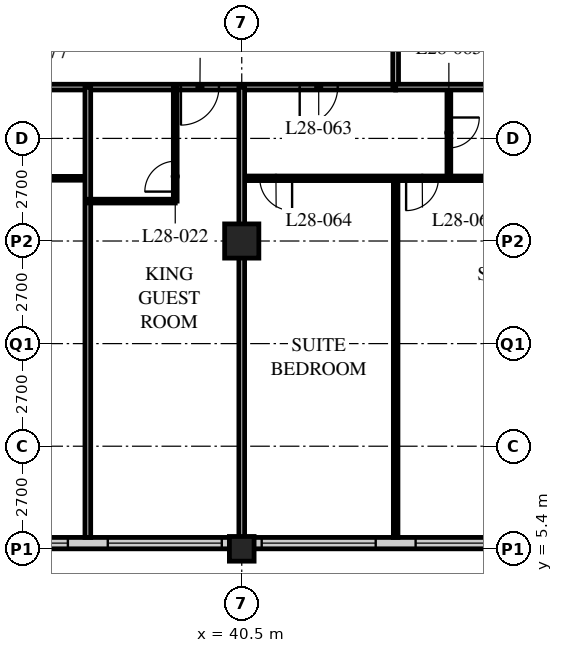
"""IFC4 building model, lengths in metres.
Left out: names, types, materials, properties, quantities, classifications, styles, units other than length and angle.
Written with IfcOpenShell. Run it as: python <this file> out.ifc"""

import sys

from ifc_helpers import new_model, si_unit, direction, frame, frame_2d, origin, origin_2d, place, context, subcontext, project, spatial, rectangle, hollow_rectangle, extrude, element, fill, save


model = new_model("IFC4")
c1 = context("Model", 3, precision=1e-05, world=origin(), true_north=direction((0.0, 1.0)))
c2 = subcontext(c1, "Body", "Model", "MODEL_VIEW")
j1 = project(units=[si_unit("LENGTHUNIT", "METRE"), si_unit("PLANEANGLEUNIT", "RADIAN")], contexts=[c1])
p1 = place(None, origin())
s1 = spatial("IfcSite", under=j1, at=p1, CompositionType="ELEMENT")
p2 = place(p1, origin())
s2 = spatial("IfcBuilding", under=s1, at=p2, CompositionType="ELEMENT")
p3 = place(p2, frame((0.0, 0.0, 113.6)))
s3 = spatial("IfcBuildingStorey", under=s2, at=p3, CompositionType="ELEMENT", Elevation=113.6)
p4 = place(p3, frame((40.5, 5.4, 0.0), z_axis=(0.0, 0.0, 1.0), x_axis=(1.0, 0.0, 0.0)))
e1 = element("IfcColumn", 1, at=p4, inside=s3, PredefinedType="COLUMN", context=c2, shape_type="SweptSolid", body=[
    extrude(hollow_rectangle(XDim=0.65, YDim=0.65, WallThickness=0.055, at=origin_2d()), origin(), (0.0, 0.0, 1.0), 3.4),
])
p5 = place(p3, frame((40.5, 13.5, 0.0), z_axis=(0.0, 0.0, 1.0), x_axis=(1.0, 0.0, 0.0)))
e2 = element("IfcColumn", 2, at=p5, inside=s3, PredefinedType="COLUMN", context=c2, shape_type="SweptSolid", body=[
    extrude(hollow_rectangle(XDim=0.9, YDim=0.9, WallThickness=0.09, at=origin_2d()), origin(), (0.0, 0.0, 1.0), 3.4),
])
p6 = place(p3, frame((8.4, 5.55, 0.0), z_axis=(0.0, 0.0, 1.0), x_axis=(1.0, 0.0, 0.0)))
e3 = element("IfcWall", 3, at=p6, inside=s3, PredefinedType="SOLIDWALL", context=c2, shape_type="SweptSolid", body=[
    extrude(rectangle(XDim=40.2, YDim=0.3, at=frame_2d((20.1, 0.0))), origin(), (0.0, 0.0, 1.0), 3.19),
])
p7 = place(p6, frame((0.225, 0.0, 0.9)))
e4 = element("IfcOpeningElement", 4, at=p7, cuts=e3, PredefinedType="OPENING", context=c2, shape_type="SweptSolid", body=[
    extrude(rectangle(XDim=3.0, YDim=2.0, at=frame_2d((1.5, 1.0))), frame((0.0, 0.16, 0.0), z_axis=(0.0, -1.0, 0.0), x_axis=(1.0, 0.0, 0.0)), (0.0, 0.0, 1.0), 0.32),
])
p8 = place(p6, frame((4.275, 0.0, 0.9)))
e5 = element("IfcOpeningElement", 5, at=p8, cuts=e3, PredefinedType="OPENING", context=c2, shape_type="SweptSolid", body=[
    extrude(rectangle(XDim=3.0, YDim=2.0, at=frame_2d((1.5, 1.0))), frame((0.0, 0.16, 0.0), z_axis=(0.0, -1.0, 0.0), x_axis=(1.0, 0.0, 0.0)), (0.0, 0.0, 1.0), 0.32),
])
p9 = place(p6, frame((8.325, 0.0, 0.9)))
e6 = element("IfcOpeningElement", 6, at=p9, cuts=e3, PredefinedType="OPENING", context=c2, shape_type="SweptSolid", body=[
    extrude(rectangle(XDim=3.0, YDim=2.0, at=frame_2d((1.5, 1.0))), frame((0.0, 0.16, 0.0), z_axis=(0.0, -1.0, 0.0), x_axis=(1.0, 0.0, 0.0)), (0.0, 0.0, 1.0), 0.32),
])
p10 = place(p6, frame((12.375, 0.0, 0.9)))
e7 = element("IfcOpeningElement", 7, at=p10, cuts=e3, PredefinedType="OPENING", context=c2, shape_type="SweptSolid", body=[
    extrude(rectangle(XDim=3.0, YDim=2.0, at=frame_2d((1.5, 1.0))), frame((0.0, 0.16, 0.0), z_axis=(0.0, -1.0, 0.0), x_axis=(1.0, 0.0, 0.0)), (0.0, 0.0, 1.0), 0.32),
])
p11 = place(p6, frame((16.425, 0.0, 0.9)))
e8 = element("IfcOpeningElement", 8, at=p11, cuts=e3, PredefinedType="OPENING", context=c2, shape_type="SweptSolid", body=[
    extrude(rectangle(XDim=3.0, YDim=2.0, at=frame_2d((1.5, 1.0))), frame((0.0, 0.16, 0.0), z_axis=(0.0, -1.0, 0.0), x_axis=(1.0, 0.0, 0.0)), (0.0, 0.0, 1.0), 0.32),
])
p12 = place(p6, frame((20.475, 0.0, 0.9)))
e9 = element("IfcOpeningElement", 9, at=p12, cuts=e3, PredefinedType="OPENING", context=c2, shape_type="SweptSolid", body=[
    extrude(rectangle(XDim=3.0, YDim=2.0, at=frame_2d((1.5, 1.0))), frame((0.0, 0.16, 0.0), z_axis=(0.0, -1.0, 0.0), x_axis=(1.0, 0.0, 0.0)), (0.0, 0.0, 1.0), 0.32),
])
p13 = place(p6, frame((24.525, 0.0, 0.9)))
e10 = element("IfcOpeningElement", 10, at=p13, cuts=e3, PredefinedType="OPENING", context=c2, shape_type="SweptSolid", body=[
    extrude(rectangle(XDim=3.0, YDim=2.0, at=frame_2d((1.5, 1.0))), frame((0.0, 0.16, 0.0), z_axis=(0.0, -1.0, 0.0), x_axis=(1.0, 0.0, 0.0)), (0.0, 0.0, 1.0), 0.32),
])
p14 = place(p6, frame((28.575, 0.0, 0.9)))
e11 = element("IfcOpeningElement", 11, at=p14, cuts=e3, PredefinedType="OPENING", context=c2, shape_type="SweptSolid", body=[
    extrude(rectangle(XDim=3.0, YDim=2.0, at=frame_2d((1.5, 1.0))), frame((0.0, 0.16, 0.0), z_axis=(0.0, -1.0, 0.0), x_axis=(1.0, 0.0, 0.0)), (0.0, 0.0, 1.0), 0.32),
])
p15 = place(p6, frame((32.625, 0.0, 0.9)))
e12 = element("IfcOpeningElement", 12, at=p15, cuts=e3, PredefinedType="OPENING", context=c2, shape_type="SweptSolid", body=[
    extrude(rectangle(XDim=3.0, YDim=2.0, at=frame_2d((1.5, 1.0))), frame((0.0, 0.16, 0.0), z_axis=(0.0, -1.0, 0.0), x_axis=(1.0, 0.0, 0.0)), (0.0, 0.0, 1.0), 0.32),
])
p16 = place(p6, frame((36.675, 0.0, 0.9)))
e13 = element("IfcOpeningElement", 13, at=p16, cuts=e3, PredefinedType="OPENING", context=c2, shape_type="SweptSolid", body=[
    extrude(rectangle(XDim=3.0, YDim=2.0, at=frame_2d((1.5, 1.0))), frame((0.0, 0.16, 0.0), z_axis=(0.0, -1.0, 0.0), x_axis=(1.0, 0.0, 0.0)), (0.0, 0.0, 1.0), 0.32),
])
p17 = place(p3, frame((12.15, 17.55, 0.0), z_axis=(0.0, 0.0, 1.0), x_axis=(1.0, 0.0, 0.0)))
e14 = element("IfcWall", 14, at=p17, inside=s3, PredefinedType="PARTITIONING", context=c2, shape_type="SweptSolid", body=[
    extrude(rectangle(XDim=32.4, YDim=0.15, at=frame_2d((16.2, 0.0))), origin(), (0.0, 0.0, 1.0), 3.19),
])
p18 = place(p17, frame((5.95, 0.0, 0.0)))
e15 = element("IfcOpeningElement", 15, at=p18, cuts=e14, PredefinedType="OPENING", context=c2, shape_type="SweptSolid", body=[
    extrude(rectangle(XDim=1.0, YDim=2.1, at=frame_2d((0.5, 1.05))), frame((0.0, 0.085, 0.0), z_axis=(0.0, -1.0, 0.0), x_axis=(1.0, 0.0, 0.0)), (0.0, 0.0, 1.0), 0.17),
])
p19 = place(p17, frame((17.725, 0.0, 0.0)))
e16 = element("IfcOpeningElement", 16, at=p19, cuts=e14, PredefinedType="OPENING", context=c2, shape_type="SweptSolid", body=[
    extrude(rectangle(XDim=1.0, YDim=2.1, at=frame_2d((0.5, 1.05))), frame((0.0, 0.085, 0.0), z_axis=(0.0, -1.0, 0.0), x_axis=(1.0, 0.0, 0.0)), (0.0, 0.0, 1.0), 0.17),
])
p20 = place(p17, frame((26.75, 0.0, 0.0)))
e17 = element("IfcOpeningElement", 17, at=p20, cuts=e14, PredefinedType="OPENING", context=c2, shape_type="SweptSolid", body=[
    extrude(rectangle(XDim=1.0, YDim=2.1, at=frame_2d((0.5, 1.05))), frame((0.0, 0.085, 0.0), z_axis=(0.0, -1.0, 0.0), x_axis=(1.0, 0.0, 0.0)), (0.0, 0.0, 1.0), 0.17),
])
p21 = place(p17, frame((1.525, 0.0, 0.0)))
e18 = element("IfcOpeningElement", 18, at=p21, cuts=e14, PredefinedType="OPENING", context=c2, shape_type="SweptSolid", body=[
    extrude(rectangle(XDim=1.0, YDim=2.1, at=frame_2d((0.5, 1.05))), frame((0.0, 0.085, 0.0), z_axis=(0.0, -1.0, 0.0), x_axis=(1.0, 0.0, 0.0)), (0.0, 0.0, 1.0), 0.17),
])
p22 = place(p17, frame((29.875, 0.0, 0.0)))
e19 = element("IfcOpeningElement", 19, at=p22, cuts=e14, PredefinedType="OPENING", context=c2, shape_type="SweptSolid", body=[
    extrude(rectangle(XDim=1.0, YDim=2.1, at=frame_2d((0.5, 1.05))), frame((0.0, 0.085, 0.0), z_axis=(0.0, -1.0, 0.0), x_axis=(1.0, 0.0, 0.0)), (0.0, 0.0, 1.0), 0.17),
])
p23 = place(p3, frame((44.55, 17.55, 0.0), z_axis=(0.0, 0.0, 1.0), x_axis=(0.0, 1.0, 0.0)))
e20 = element("IfcWall", 20, at=p23, inside=s3, PredefinedType="PARTITIONING", context=c2, shape_type="SweptSolid", body=[
    extrude(rectangle(XDim=28.35, YDim=0.15, at=frame_2d((14.175, 0.0))), origin(), (0.0, 0.0, 1.0), 3.19),
])
p24 = place(p23, frame((2.75, 0.0, 0.0)))
e21 = element("IfcOpeningElement", 21, at=p24, cuts=e20, PredefinedType="OPENING", context=c2, shape_type="SweptSolid", body=[
    extrude(rectangle(XDim=1.0, YDim=2.1, at=frame_2d((0.5, 1.05))), frame((0.0, 0.085, 0.0), z_axis=(0.0, -1.0, 0.0), x_axis=(1.0, 0.0, 0.0)), (0.0, 0.0, 1.0), 0.17),
])
p25 = place(p23, frame((6.5, 0.0, 0.0)))
e22 = element("IfcOpeningElement", 22, at=p25, cuts=e20, PredefinedType="OPENING", context=c2, shape_type="SweptSolid", body=[
    extrude(rectangle(XDim=1.0, YDim=2.1, at=frame_2d((0.5, 1.05))), frame((0.0, 0.085, 0.0), z_axis=(0.0, -1.0, 0.0), x_axis=(1.0, 0.0, 0.0)), (0.0, 0.0, 1.0), 0.17),
])
p26 = place(p23, frame((10.0, 0.0, 0.0)))
e23 = element("IfcOpeningElement", 23, at=p26, cuts=e20, PredefinedType="OPENING", context=c2, shape_type="SweptSolid", body=[
    extrude(rectangle(XDim=1.0, YDim=2.1, at=frame_2d((0.5, 1.05))), frame((0.0, 0.085, 0.0), z_axis=(0.0, -1.0, 0.0), x_axis=(1.0, 0.0, 0.0)), (0.0, 0.0, 1.0), 0.17),
])
p27 = place(p23, frame((21.65, 0.0, 0.0)))
e24 = element("IfcOpeningElement", 24, at=p27, cuts=e20, PredefinedType="OPENING", context=c2, shape_type="SweptSolid", body=[
    extrude(rectangle(XDim=1.0, YDim=2.1, at=frame_2d((0.5, 1.05))), frame((0.0, 0.085, 0.0), z_axis=(0.0, -1.0, 0.0), x_axis=(1.0, 0.0, 0.0)), (0.0, 0.0, 1.0), 0.17),
])
p28 = place(p23, frame((26.75, 0.0, 0.0)))
e25 = element("IfcOpeningElement", 25, at=p28, cuts=e20, PredefinedType="OPENING", context=c2, shape_type="SweptSolid", body=[
    extrude(rectangle(XDim=1.0, YDim=2.1, at=frame_2d((0.5, 1.05))), frame((0.0, 0.085, 0.0), z_axis=(0.0, -1.0, 0.0), x_axis=(1.0, 0.0, 0.0)), (0.0, 0.0, 1.0), 0.17),
])
p29 = place(p3, frame((33.85, 15.15, 0.0), z_axis=(0.0, 0.0, 1.0), x_axis=(1.0, 0.0, 0.0)))
e26 = element("IfcWall", 26, at=p29, inside=s3, PredefinedType="PARTITIONING", context=c2, shape_type="SweptSolid", body=[
    extrude(rectangle(XDim=2.6, YDim=0.1, at=frame_2d((1.3, 0.0))), origin(), (0.0, 0.0, 1.0), 3.19),
])
p30 = place(p3, frame((36.45, 17.55, 0.0), z_axis=(0.0, 0.0, 1.0), x_axis=(0.0, -1.0, 0.0)))
e27 = element("IfcWall", 27, at=p30, inside=s3, PredefinedType="PARTITIONING", context=c2, shape_type="SweptSolid", body=[
    extrude(rectangle(XDim=11.85, YDim=0.15, at=frame_2d((5.925, 0.0))), origin(), (0.0, 0.0, 1.0), 3.19),
])
p31 = place(p3, frame((36.45, 14.55, 0.0), z_axis=(0.0, 0.0, 1.0), x_axis=(1.0, 0.0, 0.0)))
e28 = element("IfcWall", 28, at=p31, inside=s3, PredefinedType="PARTITIONING", context=c2, shape_type="SweptSolid", body=[
    extrude(rectangle(XDim=2.3, YDim=0.1, at=frame_2d((1.15, 0.0))), origin(), (0.0, 0.0, 1.0), 3.19),
])
p32 = place(p3, frame((38.75, 17.55, 0.0), z_axis=(0.0, 0.0, 1.0), x_axis=(0.0, -1.0, 0.0)))
e29 = element("IfcWall", 29, at=p32, inside=s3, PredefinedType="PARTITIONING", context=c2, shape_type="SweptSolid", body=[
    extrude(rectangle(XDim=3.0, YDim=0.1, at=frame_2d((1.5, 0.0))), origin(), (0.0, 0.0, 1.0), 3.19),
])
p33 = place(p32, frame((1.95, 0.0, 0.0)))
e30 = element("IfcOpeningElement", 30, at=p33, cuts=e29, PredefinedType="OPENING", context=c2, shape_type="SweptSolid", body=[
    extrude(rectangle(XDim=0.8, YDim=2.1, at=frame_2d((0.4, 1.05))), frame((0.0, 0.06, 0.0), z_axis=(0.0, -1.0, 0.0), x_axis=(1.0, 0.0, 0.0)), (0.0, 0.0, 1.0), 0.12),
])
p34 = place(p3, frame((40.5, 15.15, 0.0), z_axis=(0.0, 0.0, 1.0), x_axis=(1.0, 0.0, 0.0)))
e31 = element("IfcWall", 31, at=p34, inside=s3, PredefinedType="PARTITIONING", context=c2, shape_type="SweptSolid", body=[
    extrude(rectangle(XDim=8.05, YDim=0.12, at=frame_2d((4.025, 0.0))), origin(), (0.0, 0.0, 1.0), 3.19),
])
p35 = place(p34, frame((0.475, 0.0, 0.0)))
e32 = element("IfcOpeningElement", 32, at=p35, cuts=e31, PredefinedType="OPENING", context=c2, shape_type="SweptSolid", body=[
    extrude(rectangle(XDim=0.85, YDim=2.1, at=frame_2d((0.425, 1.05))), frame((0.0, 0.07, 0.0), z_axis=(0.0, -1.0, 0.0), x_axis=(1.0, 0.0, 0.0)), (0.0, 0.0, 1.0), 0.14),
])
p36 = place(p34, frame((4.325, 0.0, 0.0)))
e33 = element("IfcOpeningElement", 33, at=p36, cuts=e31, PredefinedType="OPENING", context=c2, shape_type="SweptSolid", body=[
    extrude(rectangle(XDim=0.85, YDim=2.1, at=frame_2d((0.425, 1.05))), frame((0.0, 0.07, 0.0), z_axis=(0.0, -1.0, 0.0), x_axis=(1.0, 0.0, 0.0)), (0.0, 0.0, 1.0), 0.14),
])
p37 = place(p3, frame((45.95, 17.55, 0.0), z_axis=(0.0, 0.0, 1.0), x_axis=(0.0, -1.0, 0.0)))
e34 = element("IfcWall", 34, at=p37, inside=s3, PredefinedType="PARTITIONING", context=c2, shape_type="SweptSolid", body=[
    extrude(rectangle(XDim=2.4, YDim=0.1, at=frame_2d((1.2, 0.0))), origin(), (0.0, 0.0, 1.0), 3.19),
])
p38 = place(p37, frame((0.8, 0.0, 0.0)))
e35 = element("IfcOpeningElement", 35, at=p38, cuts=e34, PredefinedType="OPENING", context=c2, shape_type="SweptSolid", body=[
    extrude(rectangle(XDim=0.8, YDim=2.1, at=frame_2d((0.4, 1.05))), frame((0.0, 0.06, 0.0), z_axis=(0.0, -1.0, 0.0), x_axis=(1.0, 0.0, 0.0)), (0.0, 0.0, 1.0), 0.12),
])
p39 = place(p3, frame((44.55, 15.15, 0.0), z_axis=(0.0, 0.0, 1.0), x_axis=(0.0, -1.0, 0.0)))
e36 = element("IfcWall", 36, at=p39, inside=s3, PredefinedType="PARTITIONING", context=c2, shape_type="SweptSolid", body=[
    extrude(rectangle(XDim=9.45, YDim=0.12, at=frame_2d((4.725, 0.0))), origin(), (0.0, 0.0, 1.0), 3.19),
])
p40 = place(p3, frame((44.55, 17.55, 0.0), z_axis=(0.0, 0.0, 1.0), x_axis=(1.0, 0.0, 0.0)))
e37 = element("IfcWall", 37, at=p40, inside=s3, PredefinedType="PARTITIONING", context=c2, shape_type="SweptSolid", body=[
    extrude(rectangle(XDim=11.85, YDim=0.15, at=frame_2d((5.925, 0.0))), origin(), (0.0, 0.0, 1.0), 3.19),
])
p41 = place(p3, frame((40.5, 17.55, 0.0), z_axis=(0.0, 0.0, 1.0), x_axis=(0.0, -1.0, 0.0)))
e38 = element("IfcWall", 38, at=p41, inside=s3, PredefinedType="PARTITIONING", context=c2, shape_type="SweptSolid", body=[
    extrude(rectangle(XDim=11.85, YDim=0.15, at=frame_2d((5.925, 0.0))), origin(), (0.0, 0.0, 1.0), 2.578),
])
p42 = place(p13, origin())
e39 = element("IfcWindow", 39, at=p42, inside=s3, PartitioningType="SINGLE_PANEL", PredefinedType="WINDOW", context=c2, shape_type="SweptSolid", body=[
    extrude(rectangle(XDim=3.0, YDim=2.0, at=frame_2d((1.5, 1.0))), frame((0.0, 0.03, 0.0), z_axis=(0.0, -1.0, 0.0), x_axis=(1.0, 0.0, 0.0)), (0.0, 0.0, 1.0), 0.06),
])
fill(e10, e39)
p43 = place(p14, origin())
e40 = element("IfcWindow", 40, at=p43, inside=s3, PartitioningType="SINGLE_PANEL", PredefinedType="WINDOW", context=c2, shape_type="SweptSolid", body=[
    extrude(rectangle(XDim=3.0, YDim=2.0, at=frame_2d((1.5, 1.0))), frame((0.0, 0.03, 0.0), z_axis=(0.0, -1.0, 0.0), x_axis=(1.0, 0.0, 0.0)), (0.0, 0.0, 1.0), 0.06),
])
fill(e11, e40)
p44 = place(p15, origin())
e41 = element("IfcWindow", 41, at=p44, inside=s3, PartitioningType="SINGLE_PANEL", PredefinedType="WINDOW", context=c2, shape_type="SweptSolid", body=[
    extrude(rectangle(XDim=3.0, YDim=2.0, at=frame_2d((1.5, 1.0))), frame((0.0, 0.03, 0.0), z_axis=(0.0, -1.0, 0.0), x_axis=(1.0, 0.0, 0.0)), (0.0, 0.0, 1.0), 0.06),
])
fill(e12, e41)
p45 = place(p16, origin())
e42 = element("IfcWindow", 42, at=p45, inside=s3, PartitioningType="SINGLE_PANEL", PredefinedType="WINDOW", context=c2, shape_type="SweptSolid", body=[
    extrude(rectangle(XDim=3.0, YDim=2.0, at=frame_2d((1.5, 1.0))), frame((0.0, 0.03, 0.0), z_axis=(0.0, -1.0, 0.0), x_axis=(1.0, 0.0, 0.0)), (0.0, 0.0, 1.0), 0.06),
])
fill(e13, e42)
p46 = place(p33, origin())
e43 = element("IfcDoor", 43, at=p46, inside=s3, OperationType="SINGLE_SWING_LEFT", PredefinedType="DOOR", context=c2, shape_type="SweptSolid", body=[
    extrude(rectangle(XDim=0.8, YDim=2.1, at=frame_2d((0.4, 1.05))), frame((0.0, 0.025, 0.0), z_axis=(0.0, -1.0, 0.0), x_axis=(1.0, 0.0, 0.0)), (0.0, 0.0, 1.0), 0.05),
])
fill(e30, e43)
p47 = place(p20, origin())
e44 = element("IfcDoor", 44, at=p47, inside=s3, OperationType="SINGLE_SWING_RIGHT", PredefinedType="DOOR", context=c2, shape_type="SweptSolid", body=[
    extrude(rectangle(XDim=1.0, YDim=2.1, at=frame_2d((0.5, 1.05))), frame((0.0, 0.025, 0.0), z_axis=(0.0, -1.0, 0.0), x_axis=(1.0, 0.0, 0.0)), (0.0, 0.0, 1.0), 0.05),
])
fill(e17, e44)
p48 = place(p22, origin())
e45 = element("IfcDoor", 45, at=p48, inside=s3, OperationType="SINGLE_SWING_RIGHT", PredefinedType="DOOR", context=c2, shape_type="SweptSolid", body=[
    extrude(rectangle(XDim=1.0, YDim=2.1, at=frame_2d((0.5, 1.05))), frame((0.0, 0.025, 0.0), z_axis=(0.0, -1.0, 0.0), x_axis=(1.0, 0.0, 0.0)), (0.0, 0.0, 1.0), 0.05),
])
fill(e19, e45)
p49 = place(p35, origin())
e46 = element("IfcDoor", 46, at=p49, inside=s3, OperationType="SINGLE_SWING_LEFT", PredefinedType="DOOR", context=c2, shape_type="SweptSolid", body=[
    extrude(rectangle(XDim=0.85, YDim=2.1, at=frame_2d((0.425, 1.05))), frame((0.0, 0.025, 0.0), z_axis=(0.0, -1.0, 0.0), x_axis=(1.0, 0.0, 0.0)), (0.0, 0.0, 1.0), 0.05),
])
fill(e32, e46)
p50 = place(p38, origin())
e47 = element("IfcDoor", 47, at=p50, inside=s3, OperationType="SINGLE_SWING_LEFT", PredefinedType="DOOR", context=c2, shape_type="SweptSolid", body=[
    extrude(rectangle(XDim=0.8, YDim=2.1, at=frame_2d((0.4, 1.05))), frame((0.0, 0.025, 0.0), z_axis=(0.0, -1.0, 0.0), x_axis=(1.0, 0.0, 0.0)), (0.0, 0.0, 1.0), 0.05),
])
fill(e35, e47)
p51 = place(p36, origin())
e48 = element("IfcDoor", 48, at=p51, inside=s3, OperationType="SINGLE_SWING_RIGHT", PredefinedType="DOOR", context=c2, shape_type="SweptSolid", body=[
    extrude(rectangle(XDim=0.85, YDim=2.1, at=frame_2d((0.425, 1.05))), frame((0.0, 0.025, 0.0), z_axis=(0.0, -1.0, 0.0), x_axis=(1.0, 0.0, 0.0)), (0.0, 0.0, 1.0), 0.05),
])
fill(e33, e48)
save(model, sys.argv[1])
